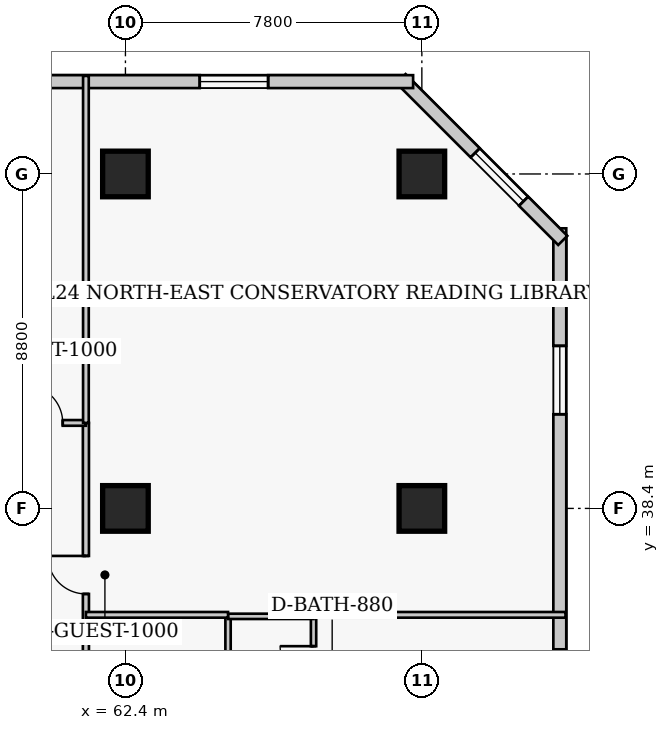
"""IFC4 building model, lengths in metres.
Left out: names, types, materials, properties, quantities, classifications, styles, units other than length and angle.
Written with IfcOpenShell. Run it as: python <this file> out.ifc"""

import sys

from ifc_helpers import new_model, si_unit, direction, frame, frame_2d, origin, origin_2d, place, context, subcontext, project, spatial, rectangle, extrude, element, fill, save


model = new_model("IFC4")
c1 = context("Model", 3, precision=1e-05, world=origin(), true_north=direction((0.0, 1.0)))
c2 = subcontext(c1, "Body", "Model", "MODEL_VIEW")
j1 = project(units=[si_unit("LENGTHUNIT", "METRE"), si_unit("PLANEANGLEUNIT", "RADIAN")], contexts=[c1])
p1 = place(None, origin())
s1 = spatial("IfcSite", under=j1, at=p1, CompositionType="ELEMENT")
p2 = place(p1, origin())
s2 = spatial("IfcBuilding", under=s1, at=p2, CompositionType="ELEMENT")
p3 = place(p2, frame((0.0, 0.0, 99.4)))
s3 = spatial("IfcBuildingStorey", under=s2, at=p3, CompositionType="ELEMENT", Elevation=99.4)
for number, where, z_axis, x_axis in (
    (1, (62.4, 38.4, 0.0), (0.0, 0.0, 1.0), (1.0, 0.0, 0.0)),
    (2, (62.4, 47.2, 0.0), (0.0, 0.0, 1.0), (1.0, 0.0, 0.0)),
    (3, (70.2, 38.4, 0.0), (0.0, 0.0, 1.0), (1.0, 0.0, 0.0)),
    (4, (70.2, 47.2, 0.0), (0.0, 0.0, 1.0), (1.0, 0.0, 0.0)),
):
    element("IfcColumn", number, at=place(p3, frame(where, z_axis=z_axis, x_axis=x_axis)), inside=s3, PredefinedType="COLUMN", context=c2, shape_type="SweptSolid", body=[
        extrude(rectangle(XDim=1.2, YDim=1.2, at=origin_2d()), origin(), (0.0, 0.0, 1.0), 3.8),
    ])
p4 = place(p3, frame((73.83, 13.83, 0.0), z_axis=(0.0, 0.0, 1.0), x_axis=(0.0, 1.0, 0.0)))
e5 = element("IfcWall", 5, at=p4, inside=s3, PredefinedType="SOLIDWALL", context=c2, shape_type="SweptSolid", body=[
    extrude(rectangle(XDim=31.94, YDim=0.34, at=frame_2d((15.97, 0.0))), origin(), (0.0, 0.0, 1.0), 3.54),
])
p5 = place(p4, frame((3.093, 0.0, 0.85)))
e6 = element("IfcOpeningElement", 6, at=p5, cuts=e5, PredefinedType="OPENING", context=c2, shape_type="SweptSolid", body=[
    extrude(rectangle(XDim=1.8, YDim=1.8, at=frame_2d((0.9, 0.9))), frame((0.0, 0.18, 0.0), z_axis=(0.0, -1.0, 0.0), x_axis=(1.0, 0.0, 0.0)), (0.0, 0.0, 1.0), 0.36),
])
p6 = place(p4, frame((11.077, 0.0, 0.85)))
e7 = element("IfcOpeningElement", 7, at=p6, cuts=e5, PredefinedType="OPENING", context=c2, shape_type="SweptSolid", body=[
    extrude(rectangle(XDim=1.8, YDim=1.8, at=frame_2d((0.9, 0.9))), frame((0.0, 0.18, 0.0), z_axis=(0.0, -1.0, 0.0), x_axis=(1.0, 0.0, 0.0)), (0.0, 0.0, 1.0), 0.36),
])
p7 = place(p4, frame((19.062, 0.0, 0.85)))
e8 = element("IfcOpeningElement", 8, at=p7, cuts=e5, PredefinedType="OPENING", context=c2, shape_type="SweptSolid", body=[
    extrude(rectangle(XDim=1.8, YDim=1.8, at=frame_2d((0.9, 0.9))), frame((0.0, 0.18, 0.0), z_axis=(0.0, -1.0, 0.0), x_axis=(1.0, 0.0, 0.0)), (0.0, 0.0, 1.0), 0.36),
])
p8 = place(p4, frame((27.048, 0.0, 0.85)))
e9 = element("IfcOpeningElement", 9, at=p8, cuts=e5, PredefinedType="OPENING", context=c2, shape_type="SweptSolid", body=[
    extrude(rectangle(XDim=1.8, YDim=1.8, at=frame_2d((0.9, 0.9))), frame((0.0, 0.18, 0.0), z_axis=(0.0, -1.0, 0.0), x_axis=(1.0, 0.0, 0.0)), (0.0, 0.0, 1.0), 0.36),
])
p9 = place(p3, frame((73.908, 45.451, 0.0), z_axis=(0.0, 0.0, 1.0), x_axis=(-0.707106781187, 0.707106781187, 0.0)))
e10 = element("IfcWall", 10, at=p9, inside=s3, PredefinedType="SOLIDWALL", context=c2, shape_type="SweptSolid", body=[
    extrude(rectangle(XDim=6.02, YDim=0.34, at=frame_2d((3.01, 0.0))), origin(), (0.0, 0.0, 1.0), 3.54),
])
p10 = place(p9, frame((1.46, 0.0, 0.85)))
e11 = element("IfcOpeningElement", 11, at=p10, cuts=e10, PredefinedType="OPENING", context=c2, shape_type="SweptSolid", body=[
    extrude(rectangle(XDim=1.8, YDim=1.8, at=frame_2d((0.9, 0.9))), frame((0.0, 0.18, 0.0), z_axis=(0.0, -1.0, 0.0), x_axis=(1.0, 0.0, 0.0)), (0.0, 0.0, 1.0), 0.36),
])
p11 = place(p3, frame((69.97, 49.63, 0.0), z_axis=(0.0, 0.0, 1.0), x_axis=(-1.0, 0.0, 0.0)))
e12 = element("IfcWall", 12, at=p11, inside=s3, PredefinedType="SOLIDWALL", context=c2, shape_type="SweptSolid", body=[
    extrude(rectangle(XDim=28.29, YDim=0.34, at=frame_2d((14.145, 0.0))), origin(), (0.0, 0.0, 1.0), 3.54),
])
p12 = place(p11, frame((3.815, 0.0, 0.85)))
e13 = element("IfcOpeningElement", 13, at=p12, cuts=e12, PredefinedType="OPENING", context=c2, shape_type="SweptSolid", body=[
    extrude(rectangle(XDim=1.8, YDim=1.8, at=frame_2d((0.9, 0.9))), frame((0.0, 0.18, 0.0), z_axis=(0.0, -1.0, 0.0), x_axis=(1.0, 0.0, 0.0)), (0.0, 0.0, 1.0), 0.36),
])
p13 = place(p11, frame((13.245, 0.0, 0.85)))
e14 = element("IfcOpeningElement", 14, at=p13, cuts=e12, PredefinedType="OPENING", context=c2, shape_type="SweptSolid", body=[
    extrude(rectangle(XDim=1.8, YDim=1.8, at=frame_2d((0.9, 0.9))), frame((0.0, 0.18, 0.0), z_axis=(0.0, -1.0, 0.0), x_axis=(1.0, 0.0, 0.0)), (0.0, 0.0, 1.0), 0.36),
])
p14 = place(p11, frame((22.675, 0.0, 0.85)))
e15 = element("IfcOpeningElement", 15, at=p14, cuts=e12, PredefinedType="OPENING", context=c2, shape_type="SweptSolid", body=[
    extrude(rectangle(XDim=1.8, YDim=1.8, at=frame_2d((0.9, 0.9))), frame((0.0, 0.18, 0.0), z_axis=(0.0, -1.0, 0.0), x_axis=(1.0, 0.0, 0.0)), (0.0, 0.0, 1.0), 0.36),
])
p15 = place(p3, frame((61.36, 11.85, 0.0), z_axis=(0.0, 0.0, 1.0), x_axis=(0.0, 1.0, 0.0)))
e16 = element("IfcWall", 16, at=p15, inside=s3, PredefinedType="PARTITIONING", context=c2, shape_type="SweptSolid", body=[
    extrude(rectangle(XDim=28.8, YDim=0.16, at=frame_2d((14.4, 0.0))), origin(), (0.0, 0.0, 1.0), 3.54),
])
p16 = place(p15, frame((3.6, 0.0, 0.0)))
e17 = element("IfcOpeningElement", 17, at=p16, cuts=e16, PredefinedType="OPENING", context=c2, shape_type="SweptSolid", body=[
    extrude(rectangle(XDim=0.95, YDim=2.1, at=frame_2d((0.475, 1.05))), frame((0.0, 0.09, 0.0), z_axis=(0.0, -1.0, 0.0), x_axis=(1.0, 0.0, 0.0)), (0.0, 0.0, 1.0), 0.18),
])
p17 = place(p15, frame((12.075, 0.0, 0.0)))
e18 = element("IfcOpeningElement", 18, at=p17, cuts=e16, PredefinedType="OPENING", context=c2, shape_type="SweptSolid", body=[
    extrude(rectangle(XDim=0.95, YDim=2.1, at=frame_2d((0.475, 1.05))), frame((0.0, 0.09, 0.0), z_axis=(0.0, -1.0, 0.0), x_axis=(1.0, 0.0, 0.0)), (0.0, 0.0, 1.0), 0.18),
])
p18 = place(p15, frame((19.875, 0.0, 0.0)))
e19 = element("IfcOpeningElement", 19, at=p18, cuts=e16, PredefinedType="OPENING", context=c2, shape_type="SweptSolid", body=[
    extrude(rectangle(XDim=0.95, YDim=2.1, at=frame_2d((0.475, 1.05))), frame((0.0, 0.09, 0.0), z_axis=(0.0, -1.0, 0.0), x_axis=(1.0, 0.0, 0.0)), (0.0, 0.0, 1.0), 0.18),
])
p19 = place(p15, frame((24.3, 0.0, 0.0)))
e20 = element("IfcOpeningElement", 20, at=p19, cuts=e16, PredefinedType="OPENING", context=c2, shape_type="SweptSolid", body=[
    extrude(rectangle(XDim=1.0, YDim=2.15, at=frame_2d((0.5, 1.075))), frame((0.0, 0.09, 0.0), z_axis=(0.0, -1.0, 0.0), x_axis=(1.0, 0.0, 0.0)), (0.0, 0.0, 1.0), 0.18),
])
p20 = place(p3, frame((56.8, 40.65, 0.0), z_axis=(0.0, 0.0, 1.0), x_axis=(1.0, 0.0, 0.0)))
e21 = element("IfcWall", 21, at=p20, inside=s3, PredefinedType="PARTITIONING", context=c2, shape_type="SweptSolid", body=[
    extrude(rectangle(XDim=4.56, YDim=0.15, at=frame_2d((2.28, 0.0))), origin(), (0.0, 0.0, 1.0), 3.54),
])
p21 = place(p20, frame((2.95, 0.0, 0.0)))
e22 = element("IfcOpeningElement", 22, at=p21, cuts=e21, PredefinedType="OPENING", context=c2, shape_type="SweptSolid", body=[
    extrude(rectangle(XDim=1.0, YDim=2.15, at=frame_2d((0.5, 1.075))), frame((0.0, 0.085, 0.0), z_axis=(0.0, -1.0, 0.0), x_axis=(1.0, 0.0, 0.0)), (0.0, 0.0, 1.0), 0.17),
])
p22 = place(p3, frame((61.36, 40.65, 0.0), z_axis=(0.0, 0.0, 1.0), x_axis=(0.0, 1.0, 0.0)))
e23 = element("IfcWall", 23, at=p22, inside=s3, PredefinedType="PARTITIONING", context=c2, shape_type="SweptSolid", body=[
    extrude(rectangle(XDim=9.13, YDim=0.15, at=frame_2d((4.565, 0.0))), origin(), (0.0, 0.0, 1.0), 3.54),
])
p23 = place(p3, frame((65.1, 33.11, 0.0), z_axis=(0.0, 0.0, 1.0), x_axis=(0.0, 1.0, 0.0)))
e24 = element("IfcWall", 24, at=p23, inside=s3, PredefinedType="PLUMBINGWALL", context=c2, shape_type="SweptSolid", body=[
    extrude(rectangle(XDim=2.45, YDim=0.14, at=frame_2d((1.225, 0.0))), origin(), (0.0, 0.0, 1.0), 3.54),
])
p24 = place(p3, frame((67.35, 33.11, 0.0), z_axis=(0.0, 0.0, 1.0), x_axis=(0.0, 1.0, 0.0)))
e25 = element("IfcWall", 25, at=p24, inside=s3, PredefinedType="PLUMBINGWALL", context=c2, shape_type="SweptSolid", body=[
    extrude(rectangle(XDim=2.45, YDim=0.14, at=frame_2d((1.225, 0.0))), origin(), (0.0, 0.0, 1.0), 3.54),
])
p25 = place(p24, frame((0.785, 0.0, 0.0)))
e26 = element("IfcOpeningElement", 26, at=p25, cuts=e25, PredefinedType="OPENING", context=c2, shape_type="SweptSolid", body=[
    extrude(rectangle(XDim=0.88, YDim=2.05, at=frame_2d((0.44, 1.025))), frame((0.0, 0.08, 0.0), z_axis=(0.0, -1.0, 0.0), x_axis=(1.0, 0.0, 0.0)), (0.0, 0.0, 1.0), 0.16),
])
p26 = place(p3, frame((65.1, 35.56, 0.0), z_axis=(0.0, 0.0, 1.0), x_axis=(1.0, 0.0, 0.0)))
e27 = element("IfcWall", 27, at=p26, inside=s3, PredefinedType="PLUMBINGWALL", context=c2, shape_type="SweptSolid", body=[
    extrude(rectangle(XDim=2.25, YDim=0.14, at=frame_2d((1.125, 0.0))), origin(), (0.0, 0.0, 1.0), 3.54),
])
p27 = place(p3, frame((61.36, 35.6, 0.0), z_axis=(0.0, 0.0, 1.0), x_axis=(1.0, 0.0, 0.0)))
e28 = element("IfcWall", 28, at=p27, inside=s3, PredefinedType="PARTITIONING", context=c2, shape_type="SweptSolid", body=[
    extrude(rectangle(XDim=3.74, YDim=0.15, at=frame_2d((1.87, 0.0))), origin(), (0.0, 0.0, 1.0), 3.54),
])
p28 = place(p3, frame((67.35, 35.6, 0.0), z_axis=(0.0, 0.0, 1.0), x_axis=(1.0, 0.0, 0.0)))
e29 = element("IfcWall", 29, at=p28, inside=s3, PredefinedType="PARTITIONING", context=c2, shape_type="SweptSolid", body=[
    extrude(rectangle(XDim=6.63, YDim=0.15, at=frame_2d((3.315, 0.0))), origin(), (0.0, 0.0, 1.0), 3.54),
])
p29 = place(p7, origin())
e30 = element("IfcWindow", 30, at=p29, inside=s3, PartitioningType="SINGLE_PANEL", PredefinedType="WINDOW", context=c2, shape_type="SweptSolid", body=[
    extrude(rectangle(XDim=1.8, YDim=1.8, at=frame_2d((0.9, 0.9))), frame((0.0, 0.03, 0.0), z_axis=(0.0, -1.0, 0.0), x_axis=(1.0, 0.0, 0.0)), (0.0, 0.0, 1.0), 0.06),
])
fill(e8, e30)
p30 = place(p8, origin())
e31 = element("IfcWindow", 31, at=p30, inside=s3, PartitioningType="SINGLE_PANEL", PredefinedType="WINDOW", context=c2, shape_type="SweptSolid", body=[
    extrude(rectangle(XDim=1.8, YDim=1.8, at=frame_2d((0.9, 0.9))), frame((0.0, 0.03, 0.0), z_axis=(0.0, -1.0, 0.0), x_axis=(1.0, 0.0, 0.0)), (0.0, 0.0, 1.0), 0.06),
])
fill(e9, e31)
p31 = place(p10, origin())
e32 = element("IfcWindow", 32, at=p31, inside=s3, PartitioningType="SINGLE_PANEL", PredefinedType="WINDOW", context=c2, shape_type="SweptSolid", body=[
    extrude(rectangle(XDim=1.8, YDim=1.8, at=frame_2d((0.9, 0.9))), frame((0.0, 0.03, 0.0), z_axis=(0.0, -1.0, 0.0), x_axis=(1.0, 0.0, 0.0)), (0.0, 0.0, 1.0), 0.06),
])
fill(e11, e32)
p32 = place(p12, origin())
e33 = element("IfcWindow", 33, at=p32, inside=s3, PartitioningType="SINGLE_PANEL", PredefinedType="WINDOW", context=c2, shape_type="SweptSolid", body=[
    extrude(rectangle(XDim=1.8, YDim=1.8, at=frame_2d((0.9, 0.9))), frame((0.0, 0.03, 0.0), z_axis=(0.0, -1.0, 0.0), x_axis=(1.0, 0.0, 0.0)), (0.0, 0.0, 1.0), 0.06),
])
fill(e13, e33)
p33 = place(p21, origin())
e34 = element("IfcDoor", 34, at=p33, inside=s3, OperationType="SINGLE_SWING_LEFT", PredefinedType="DOOR", context=c2, shape_type="SweptSolid", body=[
    extrude(rectangle(XDim=1.0, YDim=2.15, at=frame_2d((0.5, 1.075))), frame((0.0, 0.025, 0.0), z_axis=(0.0, -1.0, 0.0), x_axis=(1.0, 0.0, 0.0)), (0.0, 0.0, 1.0), 0.05),
])
fill(e22, e34)
p34 = place(p25, origin())
e35 = element("IfcDoor", 35, at=p34, inside=s3, OperationType="SINGLE_SWING_RIGHT", PredefinedType="DOOR", context=c2, shape_type="SweptSolid", body=[
    extrude(rectangle(XDim=0.88, YDim=2.05, at=frame_2d((0.44, 1.025))), frame((0.0, 0.025, 0.0), z_axis=(0.0, -1.0, 0.0), x_axis=(1.0, 0.0, 0.0)), (0.0, 0.0, 1.0), 0.05),
])
fill(e26, e35)
p35 = place(p19, origin())
e36 = element("IfcDoor", 36, at=p35, inside=s3, OperationType="SINGLE_SWING_RIGHT", PredefinedType="DOOR", context=c2, shape_type="SweptSolid", body=[
    extrude(rectangle(XDim=1.0, YDim=2.15, at=frame_2d((0.5, 1.075))), frame((0.0, 0.025, 0.0), z_axis=(0.0, -1.0, 0.0), x_axis=(1.0, 0.0, 0.0)), (0.0, 0.0, 1.0), 0.05),
])
fill(e20, e36)
save(model, sys.argv[1])
